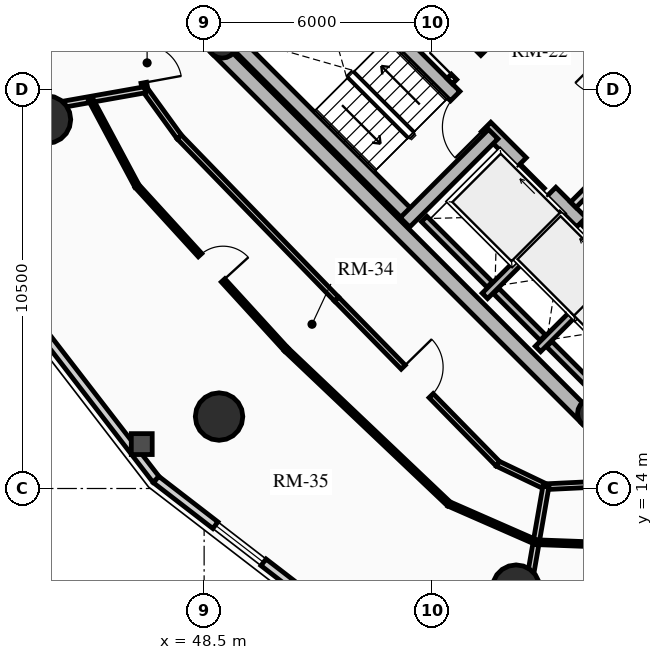
"""IFC4 building model, lengths in metres.
Left out: names, types, materials, properties, quantities, classifications, styles, units other than length and angle.
Written with IfcOpenShell. Run it as: python <this file> out.ifc"""

import sys

from ifc_helpers import new_model, si_unit, direction, frame, frame_2d, origin, origin_2d, place, context, subcontext, project, spatial, rectangle, circle, hollow_circle, extrude, source, transform, mapped, element, fill, save


model = new_model("IFC4")
c1 = context("Model", 3, precision=1e-05, world=origin(), true_north=direction((0.0, 1.0)))
c2 = subcontext(c1, "Body", "Model", "MODEL_VIEW")
j1 = project(units=[si_unit("LENGTHUNIT", "METRE"), si_unit("PLANEANGLEUNIT", "RADIAN")], contexts=[c1])
p1 = place(None, origin())
s1 = spatial("IfcSite", under=j1, at=p1, CompositionType="ELEMENT")
p2 = place(p1, origin())
s2 = spatial("IfcBuilding", under=s1, at=p2, CompositionType="ELEMENT")
p3 = place(p2, frame((0.0, 0.0, 166.15)))
s3 = spatial("IfcBuildingStorey", under=s2, at=p3, CompositionType="ELEMENT", Elevation=166.15)
for number, where, z_axis, x_axis in (
    (1, (58.702, 15.732, 0.0), (0.0, 0.0, 1.0), (-0.707, 0.707, 0.0)),
    (2, (66.268, 23.298, 0.0), (0.0, 0.0, 1.0), (-0.707, 0.707, 0.0)),
):
    element("IfcWall", number, at=place(p3, frame(where, z_axis=z_axis, x_axis=x_axis)), inside=s3, PredefinedType="SHEAR", context=c2, shape_type="SweptSolid", body=[
        extrude(rectangle(XDim=14.1, YDim=0.4, at=frame_2d((7.05, 0.0))), origin(), (0.0, 0.0, 1.0), 2.91),
    ])
p4 = place(p3, frame((58.561, 15.873, 0.0), z_axis=(0.0, 0.0, 1.0), x_axis=(0.707106781187, 0.707106781187, 0.0)))
e3 = element("IfcWall", 3, at=p4, inside=s3, PredefinedType="SHEAR", context=c2, shape_type="SweptSolid", body=[
    extrude(rectangle(XDim=10.7, YDim=0.4, at=frame_2d((5.35, 0.0))), origin(), (0.0, 0.0, 1.0), 2.91),
])
m1 = source(origin(), c2, "Body", "SweptSolid", [
    extrude(rectangle(XDim=1.5, YDim=2.02, at=frame_2d((0.75, 1.01))), frame((0.0, 0.21, 0.0), z_axis=(0.0, -1.0, 0.0), x_axis=(1.0, 0.0, 0.0)), (0.0, 0.0, 1.0), 0.42),
])
p5 = place(p4, frame((5.45, 0.0, 0.0)))
e4 = element("IfcOpeningElement", 4, at=p5, cuts=e3, PredefinedType="OPENING", context=c2, shape_type="MappedRepresentation", body=[
    mapped(m1, transform((0.0, 0.0, 0.0), x_axis=(1.0, 0.0, 0.0), y_axis=(0.0, 1.0, 0.0), z_axis=(0.0, 0.0, 1.0), scale=1.0)),
])
p6 = place(p3, frame((48.873, 25.561, 0.0), z_axis=(0.0, 0.0, 1.0), x_axis=(0.707106781187, 0.707106781187, 0.0)))
e5 = element("IfcWall", 5, at=p6, inside=s3, PredefinedType="SHEAR", context=c2, shape_type="SweptSolid", body=[
    extrude(rectangle(XDim=10.7, YDim=0.4, at=frame_2d((5.35, 0.0))), origin(), (0.0, 0.0, 1.0), 2.91),
])
p7 = place(p6, frame((4.6, 0.0, 0.0)))
e6 = element("IfcOpeningElement", 6, at=p7, cuts=e5, PredefinedType="OPENING", context=c2, shape_type="MappedRepresentation", body=[
    mapped(m1, transform((0.0, 0.0, 0.0), x_axis=(1.0, 0.0, 0.0), y_axis=(0.0, 1.0, 0.0), z_axis=(0.0, 0.0, 1.0), scale=1.0)),
])
p8 = place(p3, frame((61.06, 18.373, 0.0), z_axis=(0.0, 0.0, 1.0), x_axis=(-0.707106781187, 0.707106781187, 0.0)))
e7 = element("IfcWall", 7, at=p8, inside=s3, PredefinedType="SHEAR", context=c2, shape_type="SweptSolid", body=[
    extrude(rectangle(XDim=13.7, YDim=0.35, at=frame_2d((6.85, 0.0))), origin(), (0.0, 0.0, 1.0), 2.91),
])
m2 = source(origin(), c2, "Body", "SweptSolid", [
    extrude(rectangle(XDim=1.1, YDim=2.015, at=frame_2d((0.55, 1.007))), frame((0.0, 0.185, 0.0), z_axis=(0.0, -1.0, 0.0), x_axis=(1.0, 0.0, 0.0)), (0.0, 0.0, 1.0), 0.37),
])
p9 = place(p8, frame((4.85, 0.0, 0.0)))
e8 = element("IfcOpeningElement", 8, at=p9, cuts=e7, PredefinedType="OPENING", context=c2, shape_type="MappedRepresentation", body=[
    mapped(m2, transform((0.0, 0.0, 0.0), x_axis=(1.0, 0.0, 0.0), y_axis=(0.0, 1.0, 0.0), z_axis=(0.0, 0.0, 1.0), scale=1.0)),
])
p10 = place(p8, frame((0.625, 0.0, 0.0)))
e9 = element("IfcOpeningElement", 9, at=p10, cuts=e7, PredefinedType="OPENING", context=c2, shape_type="MappedRepresentation", body=[
    mapped(m2, transform((0.0, 0.0, 0.0), x_axis=(1.0, 0.0, 0.0), y_axis=(0.0, 1.0, 0.0), z_axis=(0.0, 0.0, 1.0), scale=1.0)),
])
p11 = place(p8, frame((2.625, 0.0, 0.0)))
e10 = element("IfcOpeningElement", 10, at=p11, cuts=e7, PredefinedType="OPENING", context=c2, shape_type="MappedRepresentation", body=[
    mapped(m2, transform((0.0, 0.0, 0.0), x_axis=(1.0, 0.0, 0.0), y_axis=(0.0, 1.0, 0.0), z_axis=(0.0, 0.0, 1.0), scale=1.0)),
])
m3 = source(origin(), c2, "Body", "SweptSolid", [
    extrude(rectangle(XDim=1.15, YDim=2.02, at=frame_2d((0.575, 1.01))), frame((0.0, 0.185, 0.0), z_axis=(0.0, -1.0, 0.0), x_axis=(1.0, 0.0, 0.0)), (0.0, 0.0, 1.0), 0.37),
])
p12 = place(p8, frame((7.27, 0.0, 0.0)))
e11 = element("IfcOpeningElement", 11, at=p12, cuts=e7, PredefinedType="OPENING", context=c2, shape_type="MappedRepresentation", body=[
    mapped(m3, transform((0.0, 0.0, 0.0), x_axis=(1.0, 0.0, 0.0), y_axis=(0.0, 1.0, 0.0), z_axis=(0.0, 0.0, 1.0), scale=1.0)),
])
p13 = place(p3, frame((63.627, 20.94, 0.0), z_axis=(0.0, 0.0, 1.0), x_axis=(-0.707119496762, 0.707094065383, 0.0)))
e12 = element("IfcWall", 12, at=p13, inside=s3, PredefinedType="SHEAR", context=c2, shape_type="SweptSolid", body=[
    extrude(rectangle(XDim=9.6, YDim=0.35, at=frame_2d((4.8, 0.0))), origin(), (0.0, 0.0, 1.0), 2.91),
])
p14 = place(p13, frame((5.28, 0.0, 0.0)))
e13 = element("IfcOpeningElement", 13, at=p14, cuts=e12, PredefinedType="OPENING", context=c2, shape_type="MappedRepresentation", body=[
    mapped(m3, transform((0.0, 0.0, 0.0), x_axis=(1.0, 0.0, 0.0), y_axis=(0.0, 1.0, 0.0), z_axis=(0.0, 0.0, 1.0), scale=1.0)),
])
p15 = place(p3, frame((53.922, 21.141, 0.0), z_axis=(0.0, 0.0, 1.0), x_axis=(-0.707106781187, 0.707106781187, 0.0)))
e14 = element("IfcWall", 14, at=p15, inside=s3, PredefinedType="SHEAR", context=c2, shape_type="SweptSolid", body=[
    extrude(rectangle(XDim=6.695, YDim=0.35, at=frame_2d((3.348, 0.0))), origin(), (0.0, 0.0, 1.0), 2.91),
])
p16 = place(p3, frame((53.784, 21.003, 0.0), z_axis=(0.0, 0.0, 1.0), x_axis=(0.707106781187, 0.707106781187, 0.0)))
e15 = element("IfcWall", 15, at=p16, inside=s3, PredefinedType="SHEAR", context=c2, shape_type="SweptSolid", body=[
    extrude(rectangle(XDim=3.285, YDim=0.35, at=frame_2d((1.643, 0.0))), origin(), (0.0, 0.0, 1.0), 2.91),
])
for number, where, z_axis, x_axis in (
    (16, (58.706, 15.976, 0.0), (0.0, 0.0, 1.0), (0.707, 0.707, 0.0)),
    (17, (48.976, 25.706, 0.0), (0.0, 0.0, 1.0), (0.707, 0.707, 0.0)),
):
    element("IfcColumn", number, at=place(p3, frame(where, z_axis=z_axis, x_axis=x_axis)), inside=s3, PredefinedType="COLUMN", context=c2, shape_type="SweptSolid", body=[
        extrude(hollow_circle(Radius=0.38, WallThickness=0.032, at=origin_2d()), origin(), (0.0, 0.0, 1.0), 2.91),
    ])
for number, where, z_axis, x_axis in (
    (18, (44.365, 23.709, 0.0), (0.0, 0.0, 1.0), (1.0, 0.0, 0.0)),
    (19, (48.893, 15.893, 0.0), (0.0, 0.0, 1.0), (1.0, 0.0, 0.0)),
    (20, (56.709, 11.365, 0.0), (0.0, 0.0, 1.0), (1.0, 0.0, 0.0)),
):
    element("IfcColumn", number, at=place(p3, frame(where, z_axis=z_axis, x_axis=x_axis)), inside=s3, PredefinedType="USERDEFINED", context=c2, shape_type="SweptSolid", body=[
        extrude(circle(Radius=0.625, at=origin_2d()), origin(), (0.0, 0.0, 1.0), 2.91),
    ])
p17 = place(p3, frame((47.236, 14.236, 0.0), z_axis=(0.0, 0.0, 1.0), x_axis=(-0.610543584779, 0.791982658323, 0.0)))
e21 = element("IfcWall", 21, at=p17, inside=s3, PredefinedType="SOLIDWALL", context=c2, shape_type="SweptSolid", body=[
    extrude(rectangle(XDim=5.537, YDim=0.22, at=frame_2d((2.769, 0.0))), origin(), (0.0, 0.0, 1.0), 2.675),
])
p18 = place(p3, frame((51.622, 10.856, 0.0), z_axis=(0.0, 0.0, 1.0), x_axis=(-0.791982658323, 0.610543584779, 0.0)))
e22 = element("IfcWall", 22, at=p18, inside=s3, PredefinedType="SOLIDWALL", context=c2, shape_type="SweptSolid", body=[
    extrude(rectangle(XDim=5.537, YDim=0.22, at=frame_2d((2.769, 0.0))), origin(), (0.0, 0.0, 1.0), 2.675),
])
m4 = source(origin(), c2, "Body", "SweptSolid", [
    extrude(rectangle(XDim=1.6, YDim=1.3, at=frame_2d((0.8, 0.65))), frame((0.0, 0.12, 0.0), z_axis=(0.0, -1.0, 0.0), x_axis=(1.0, 0.0, 0.0)), (0.0, 0.0, 1.0), 0.24),
])
p19 = place(p18, frame((1.968, 0.0, 0.65)))
e23 = element("IfcOpeningElement", 23, at=p19, cuts=e22, PredefinedType="OPENING", context=c2, shape_type="MappedRepresentation", body=[
    mapped(m4, transform((0.0, 0.0, 0.0), x_axis=(1.0, 0.0, 0.0), y_axis=(0.0, 1.0, 0.0), z_axis=(0.0, 0.0, 1.0), scale=1.0)),
])
p20 = place(p3, frame((55.888, 19.069, 0.0), z_axis=(0.0, 0.0, 1.0), x_axis=(0.707106781187, 0.707106781187, 0.0)))
e24 = element("IfcWall", 24, at=p20, inside=s3, PredefinedType="SHEAR", context=c2, shape_type="SweptSolid", body=[
    extrude(rectangle(XDim=2.97, YDim=0.2, at=frame_2d((1.485, 0.0))), origin(), (0.0, 0.0, 1.0), 2.91),
])
p21 = place(p3, frame((56.015, 19.366, 0.0), z_axis=(0.0, 0.0, 1.0), x_axis=(-0.707106781187, 0.707106781187, 0.0)))
e25 = element("IfcWall", 25, at=p21, inside=s3, PredefinedType="SHEAR", context=c2, shape_type="SweptSolid", body=[
    extrude(rectangle(XDim=2.44, YDim=0.2, at=frame_2d((1.22, 0.0))), origin(), (0.0, 0.0, 1.0), 2.91),
])
p22 = place(p3, frame((57.284, 17.673, 0.0), z_axis=(0.0, 0.0, 1.0), x_axis=(0.707147878904, 0.70706568108, 0.0)))
e26 = element("IfcWall", 26, at=p22, inside=s3, PredefinedType="SHEAR", context=c2, shape_type="SweptSolid", body=[
    extrude(rectangle(XDim=2.97, YDim=0.2, at=frame_2d((1.485, 0.0))), origin(), (0.0, 0.0, 1.0), 2.91),
])
p23 = place(p3, frame((57.412, 17.97, 0.0), z_axis=(0.0, 0.0, 1.0), x_axis=(-0.707106781187, 0.707106781187, 0.0)))
e27 = element("IfcWall", 27, at=p23, inside=s3, PredefinedType="SHEAR", context=c2, shape_type="SweptSolid", body=[
    extrude(rectangle(XDim=1.735, YDim=0.2, at=frame_2d((0.867, 0.0))), origin(), (0.0, 0.0, 1.0), 2.91),
])
p24 = place(p3, frame((58.737, 16.644, 0.0), z_axis=(0.0, 0.0, 1.0), x_axis=(-0.707032117043, 0.707181437447, 0.0)))
e28 = element("IfcWall", 28, at=p24, inside=s3, PredefinedType="SHEAR", context=c2, shape_type="SweptSolid", body=[
    extrude(rectangle(XDim=1.635, YDim=0.2, at=frame_2d((0.817, 0.0))), origin(), (0.0, 0.0, 1.0), 2.91),
])
p25 = place(p3, frame((58.214, 21.467, 0.0), z_axis=(0.0, 0.0, 1.0), x_axis=(0.707106781187, 0.707106781187, 0.0)))
e29 = element("IfcWall", 29, at=p25, inside=s3, PredefinedType="PARTITIONING", context=c2, shape_type="SweptSolid", body=[
    extrude(rectangle(XDim=3.28, YDim=0.2, at=frame_2d((1.64, 0.0))), origin(), (0.0, 0.0, 1.0), 2.675),
])
m5 = source(origin(), c2, "Body", "SweptSolid", [
    extrude(rectangle(XDim=1.5, YDim=2.02, at=frame_2d((0.75, 1.01))), frame((0.0, 0.11, 0.0), z_axis=(0.0, -1.0, 0.0), x_axis=(1.0, 0.0, 0.0)), (0.0, 0.0, 1.0), 0.22),
])
p26 = place(p25, frame((1.55, 0.0, 0.0)))
e30 = element("IfcOpeningElement", 30, at=p26, cuts=e29, PredefinedType="OPENING", context=c2, shape_type="MappedRepresentation", body=[
    mapped(m5, transform((0.0, 0.0, 0.0), x_axis=(1.0, 0.0, 0.0), y_axis=(0.0, 1.0, 0.0), z_axis=(0.0, 0.0, 1.0), scale=1.0)),
])
p27 = place(p3, frame((54.961, 24.719, 0.0), z_axis=(0.0, 0.0, 1.0), x_axis=(0.707106781187, 0.707106781187, 0.0)))
e31 = element("IfcWall", 31, at=p27, inside=s3, PredefinedType="PARTITIONING", context=c2, shape_type="SweptSolid", body=[
    extrude(rectangle(XDim=3.28, YDim=0.2, at=frame_2d((1.64, 0.0))), origin(), (0.0, 0.0, 1.0), 2.675),
])
m6 = source(origin(), c2, "Body", "SweptSolid", [
    extrude(rectangle(XDim=0.9, YDim=2.005, at=frame_2d((0.45, 1.002))), frame((0.0, 0.11, 0.0), z_axis=(0.0, -1.0, 0.0), x_axis=(1.0, 0.0, 0.0)), (0.0, 0.0, 1.0), 0.22),
])
p28 = place(p27, frame((0.16, 0.0, 0.0)))
e32 = element("IfcOpeningElement", 32, at=p28, cuts=e31, PredefinedType="OPENING", context=c2, shape_type="MappedRepresentation", body=[
    mapped(m6, transform((0.0, 0.0, 0.0), x_axis=(1.0, 0.0, 0.0), y_axis=(0.0, 1.0, 0.0), z_axis=(0.0, 0.0, 1.0), scale=1.0)),
])
p29 = place(p3, frame((46.699, 25.843, 0.0), z_axis=(0.0, 0.0, 1.0), x_axis=(0.180451258011, -0.983583928032, 0.0)))
e33 = element("IfcWall", 33, at=p29, inside=s3, PredefinedType="PARTITIONING", context=c2, shape_type="SweptSolid", body=[
    extrude(rectangle(XDim=1.372, YDim=0.15, at=frame_2d((0.686, 0.0))), origin(), (0.0, 0.0, 1.0), 2.245),
])
m7 = source(origin(), c2, "Body", "SweptSolid", [
    extrude(rectangle(XDim=1.0, YDim=2.015, at=frame_2d((0.5, 1.007))), frame((0.0, 0.085, 0.0), z_axis=(0.0, -1.0, 0.0), x_axis=(1.0, 0.0, 0.0)), (0.0, 0.0, 1.0), 0.17),
])
p30 = place(p29, frame((0.186, 0.0, 0.0)))
e34 = element("IfcOpeningElement", 34, at=p30, cuts=e33, PredefinedType="OPENING", context=c2, shape_type="MappedRepresentation", body=[
    mapped(m7, transform((0.0, 0.0, 0.0), x_axis=(1.0, 0.0, 0.0), y_axis=(0.0, 1.0, 0.0), z_axis=(0.0, 0.0, 1.0), scale=1.0)),
])
p31 = place(p3, frame((46.946, 24.494, 0.0), z_axis=(0.0, 0.0, 1.0), x_axis=(0.586340262528, -0.810064871809, 0.0)))
e35 = element("IfcWall", 35, at=p31, inside=s3, PredefinedType="PARTITIONING", context=c2, shape_type="SweptSolid", body=[
    extrude(rectangle(XDim=1.531, YDim=0.15, at=frame_2d((0.766, 0.0))), origin(), (0.0, 0.0, 1.0), 2.245),
])
p32 = place(p3, frame((47.844, 23.253, 0.0), z_axis=(0.0, 0.0, 1.0), x_axis=(0.696248411352, -0.717800912293, 0.0)))
e36 = element("IfcWall", 36, at=p32, inside=s3, PredefinedType="PARTITIONING", context=c2, shape_type="SweptSolid", body=[
    extrude(rectangle(XDim=5.947, YDim=0.15, at=frame_2d((2.974, 0.0))), origin(), (0.0, 0.0, 1.0), 2.675),
])
p33 = place(p3, frame((51.985, 18.985, 0.0), z_axis=(0.0, 0.0, 1.0), x_axis=(0.699619654291, -0.714515457726, 0.0)))
e37 = element("IfcWall", 37, at=p33, inside=s3, PredefinedType="PARTITIONING", context=c2, shape_type="SweptSolid", body=[
    extrude(rectangle(XDim=6.064, YDim=0.15, at=frame_2d((3.032, 0.0))), origin(), (0.0, 0.0, 1.0), 2.245),
])
m8 = source(origin(), c2, "Body", "SweptSolid", [
    extrude(rectangle(XDim=1.05, YDim=2.015, at=frame_2d((0.525, 1.007))), frame((0.0, 0.085, 0.0), z_axis=(0.0, -1.0, 0.0), x_axis=(1.0, 0.0, 0.0)), (0.0, 0.0, 1.0), 0.17),
])
p34 = place(p33, frame((2.507, 0.0, 0.0)))
e38 = element("IfcOpeningElement", 38, at=p34, cuts=e37, PredefinedType="OPENING", context=c2, shape_type="MappedRepresentation", body=[
    mapped(m8, transform((0.0, 0.0, 0.0), x_axis=(1.0, 0.0, 0.0), y_axis=(0.0, 1.0, 0.0), z_axis=(0.0, 0.0, 1.0), scale=1.0)),
])
p35 = place(p3, frame((56.227, 14.652, 0.0), z_axis=(0.0, 0.0, 1.0), x_axis=(0.902364039563, -0.430974639745, 0.0)))
e39 = element("IfcWall", 39, at=p35, inside=s3, PredefinedType="PARTITIONING", context=c2, shape_type="SweptSolid", body=[
    extrude(rectangle(XDim=1.401, YDim=0.15, at=frame_2d((0.701, 0.0))), origin(), (0.0, 0.0, 1.0), 2.245),
])
p36 = place(p3, frame((57.492, 14.048, 0.0), z_axis=(0.0, 0.0, 1.0), x_axis=(0.99885011351, 0.047942160364, 0.0)))
e40 = element("IfcWall", 40, at=p36, inside=s3, PredefinedType="PARTITIONING", context=c2, shape_type="SweptSolid", body=[
    extrude(rectangle(XDim=1.477, YDim=0.15, at=frame_2d((0.738, 0.0))), origin(), (0.0, 0.0, 1.0), 2.245),
])
p37 = place(p3, frame((46.946, 24.494, 0.0), z_axis=(0.0, 0.0, 1.0), x_axis=(-0.984604227647, -0.174798497988, 0.0)))
e41 = element("IfcWall", 41, at=p37, inside=s3, PredefinedType="PARTITIONING", context=c2, shape_type="SweptSolid", body=[
    extrude(rectangle(XDim=5.196, YDim=0.16, at=frame_2d((2.598, 0.0))), origin(), (0.0, 0.0, 1.0), 2.245),
])
p38 = place(p3, frame((57.492, 14.048, 0.0), z_axis=(0.0, 0.0, 1.0), x_axis=(-0.171191349619, -0.985237799628, 0.0)))
e42 = element("IfcWall", 42, at=p38, inside=s3, PredefinedType="PARTITIONING", context=c2, shape_type="SweptSolid", body=[
    extrude(rectangle(XDim=5.295, YDim=0.16, at=frame_2d((2.647, 0.0))), origin(), (0.0, 0.0, 1.0), 2.245),
])
p39 = place(p3, frame((45.514, 24.239, 0.0), z_axis=(0.0, 0.0, 1.0), x_axis=(0.471225296528, -0.882012879674, 0.0)))
e43 = element("IfcWall", 43, at=p39, inside=s3, PredefinedType="PARTITIONING", context=c2, shape_type="SweptSolid", body=[
    extrude(rectangle(XDim=2.585, YDim=0.125, at=frame_2d((1.292, 0.0))), origin(), (0.0, 0.0, 1.0), 2.245),
])
p40 = place(p3, frame((46.732, 21.959, 0.0), z_axis=(0.0, 0.0, 1.0), x_axis=(0.674328014222, -0.738431939474, 0.0)))
e44 = element("IfcWall", 44, at=p40, inside=s3, PredefinedType="PARTITIONING", context=c2, shape_type="SweptSolid", body=[
    extrude(rectangle(XDim=5.823, YDim=0.125, at=frame_2d((2.912, 0.0))), origin(), (0.0, 0.0, 1.0), 2.675),
])
m9 = source(origin(), c2, "Body", "SweptSolid", [
    extrude(rectangle(XDim=0.9, YDim=2.005, at=frame_2d((0.45, 1.002))), frame((0.0, 0.073, 0.0), z_axis=(0.0, -1.0, 0.0), x_axis=(1.0, 0.0, 0.0)), (0.0, 0.0, 1.0), 0.145),
])
p41 = place(p40, frame((2.462, 0.0, 0.0)))
e45 = element("IfcOpeningElement", 45, at=p41, cuts=e44, PredefinedType="OPENING", context=c2, shape_type="MappedRepresentation", body=[
    mapped(m9, transform((0.0, 0.0, 0.0), x_axis=(1.0, 0.0, 0.0), y_axis=(0.0, 1.0, 0.0), z_axis=(0.0, 0.0, 1.0), scale=1.0)),
])
p42 = place(p3, frame((50.659, 17.659, 0.0), z_axis=(0.0, 0.0, 1.0), x_axis=(0.72516873678, -0.688571204159, 0.0)))
e46 = element("IfcWall", 46, at=p42, inside=s3, PredefinedType="PARTITIONING", context=c2, shape_type="SweptSolid", body=[
    extrude(rectangle(XDim=5.904, YDim=0.125, at=frame_2d((2.952, 0.0))), origin(), (0.0, 0.0, 1.0), 2.245),
])
p43 = place(p3, frame((54.94, 13.594, 0.0), z_axis=(0.0, 0.0, 1.0), x_axis=(0.915898070967, -0.401410916143, 0.0)))
e47 = element("IfcWall", 47, at=p43, inside=s3, PredefinedType="PARTITIONING", context=c2, shape_type="SweptSolid", body=[
    extrude(rectangle(XDim=2.509, YDim=0.125, at=frame_2d((1.254, 0.0))), origin(), (0.0, 0.0, 1.0), 2.245),
])
p44 = place(p3, frame((57.238, 12.587, 0.0), z_axis=(0.0, 0.0, 1.0), x_axis=(0.999316318576, -0.036971548882, 0.0)))
e48 = element("IfcWall", 48, at=p44, inside=s3, PredefinedType="PARTITIONING", context=c2, shape_type="SweptSolid", body=[
    extrude(rectangle(XDim=2.476, YDim=0.125, at=frame_2d((1.238, 0.0))), origin(), (0.0, 0.0, 1.0), 2.245),
])
m10 = source(origin(), c2, "Body", "SweptSolid", [
    extrude(rectangle(XDim=1.6, YDim=1.3, at=frame_2d((0.8, 0.65))), frame((0.0, 0.03, 0.0), z_axis=(0.0, -1.0, 0.0), x_axis=(1.0, 0.0, 0.0)), (0.0, 0.0, 1.0), 0.06),
])
p45 = place(p19, origin())
e49 = element("IfcWindow", 49, at=p45, inside=s3, PartitioningType="SINGLE_PANEL", PredefinedType="WINDOW", context=c2, shape_type="MappedRepresentation", body=[
    mapped(m10, transform((0.0, 0.0, 0.0), x_axis=(1.0, 0.0, 0.0), y_axis=(0.0, 1.0, 0.0), z_axis=(0.0, 0.0, 1.0), scale=1.0)),
])
fill(e23, e49)
m11 = source(origin(), c2, "Body", "SweptSolid", [
    extrude(rectangle(XDim=1.1, YDim=2.015, at=frame_2d((0.55, 1.007))), frame((0.0, 0.025, 0.0), z_axis=(0.0, -1.0, 0.0), x_axis=(1.0, 0.0, 0.0)), (0.0, 0.0, 1.0), 0.05),
])
p46 = place(p9, origin())
e50 = element("IfcDoor", 50, at=p46, inside=s3, OperationType="SLIDING_TO_RIGHT", PredefinedType="DOOR", context=c2, shape_type="MappedRepresentation", body=[
    mapped(m11, transform((0.0, 0.0, 0.0), x_axis=(1.0, 0.0, 0.0), y_axis=(0.0, 1.0, 0.0), z_axis=(0.0, 0.0, 1.0), scale=1.0)),
])
fill(e8, e50)
p47 = place(p11, origin())
e51 = element("IfcDoor", 51, at=p47, inside=s3, OperationType="SLIDING_TO_RIGHT", PredefinedType="DOOR", context=c2, shape_type="MappedRepresentation", body=[
    mapped(m11, transform((0.0, 0.0, 0.0), x_axis=(1.0, 0.0, 0.0), y_axis=(0.0, 1.0, 0.0), z_axis=(0.0, 0.0, 1.0), scale=1.0)),
])
fill(e10, e51)
m12 = source(origin(), c2, "Body", "SweptSolid", [
    extrude(rectangle(XDim=1.15, YDim=2.02, at=frame_2d((0.575, 1.01))), frame((0.0, 0.025, 0.0), z_axis=(0.0, -1.0, 0.0), x_axis=(1.0, 0.0, 0.0)), (0.0, 0.0, 1.0), 0.05),
])
p48 = place(p12, origin())
e52 = element("IfcDoor", 52, at=p48, inside=s3, OperationType="SINGLE_SWING_LEFT", PredefinedType="DOOR", context=c2, shape_type="MappedRepresentation", body=[
    mapped(m12, transform((0.0, 0.0, 0.0), x_axis=(1.0, 0.0, 0.0), y_axis=(0.0, 1.0, 0.0), z_axis=(0.0, 0.0, 1.0), scale=1.0)),
])
fill(e11, e52)
m13 = source(origin(), c2, "Body", "SweptSolid", [
    extrude(rectangle(XDim=0.9, YDim=2.005, at=frame_2d((0.45, 1.002))), frame((0.0, 0.025, 0.0), z_axis=(0.0, -1.0, 0.0), x_axis=(1.0, 0.0, 0.0)), (0.0, 0.0, 1.0), 0.05),
])
p49 = place(p28, origin())
e53 = element("IfcDoor", 53, at=p49, inside=s3, OperationType="SINGLE_SWING_LEFT", PredefinedType="DOOR", context=c2, shape_type="MappedRepresentation", body=[
    mapped(m13, transform((0.0, 0.0, 0.0), x_axis=(1.0, 0.0, 0.0), y_axis=(0.0, 1.0, 0.0), z_axis=(0.0, 0.0, 1.0), scale=1.0)),
])
fill(e32, e53)
m14 = source(origin(), c2, "Body", "SweptSolid", [
    extrude(rectangle(XDim=1.0, YDim=2.015, at=frame_2d((0.5, 1.007))), frame((0.0, 0.025, 0.0), z_axis=(0.0, -1.0, 0.0), x_axis=(1.0, 0.0, 0.0)), (0.0, 0.0, 1.0), 0.05),
])
p50 = place(p30, origin())
e54 = element("IfcDoor", 54, at=p50, inside=s3, OperationType="SINGLE_SWING_RIGHT", PredefinedType="DOOR", context=c2, shape_type="MappedRepresentation", body=[
    mapped(m14, transform((0.0, 0.0, 0.0), x_axis=(1.0, 0.0, 0.0), y_axis=(0.0, 1.0, 0.0), z_axis=(0.0, 0.0, 1.0), scale=1.0)),
])
fill(e34, e54)
m15 = source(origin(), c2, "Body", "SweptSolid", [
    extrude(rectangle(XDim=1.05, YDim=2.015, at=frame_2d((0.525, 1.007))), frame((0.0, 0.025, 0.0), z_axis=(0.0, -1.0, 0.0), x_axis=(1.0, 0.0, 0.0)), (0.0, 0.0, 1.0), 0.05),
])
p51 = place(p34, origin())
e55 = element("IfcDoor", 55, at=p51, inside=s3, OperationType="SINGLE_SWING_LEFT", PredefinedType="DOOR", context=c2, shape_type="MappedRepresentation", body=[
    mapped(m15, transform((0.0, 0.0, 0.0), x_axis=(1.0, 0.0, 0.0), y_axis=(0.0, 1.0, 0.0), z_axis=(0.0, 0.0, 1.0), scale=1.0)),
])
fill(e38, e55)
p52 = place(p41, origin())
e56 = element("IfcDoor", 56, at=p52, inside=s3, OperationType="SINGLE_SWING_RIGHT", PredefinedType="DOOR", context=c2, shape_type="MappedRepresentation", body=[
    mapped(m13, transform((0.0, 0.0, 0.0), x_axis=(1.0, 0.0, 0.0), y_axis=(0.0, 1.0, 0.0), z_axis=(0.0, 0.0, 1.0), scale=1.0)),
])
fill(e45, e56)
save(model, sys.argv[1])
